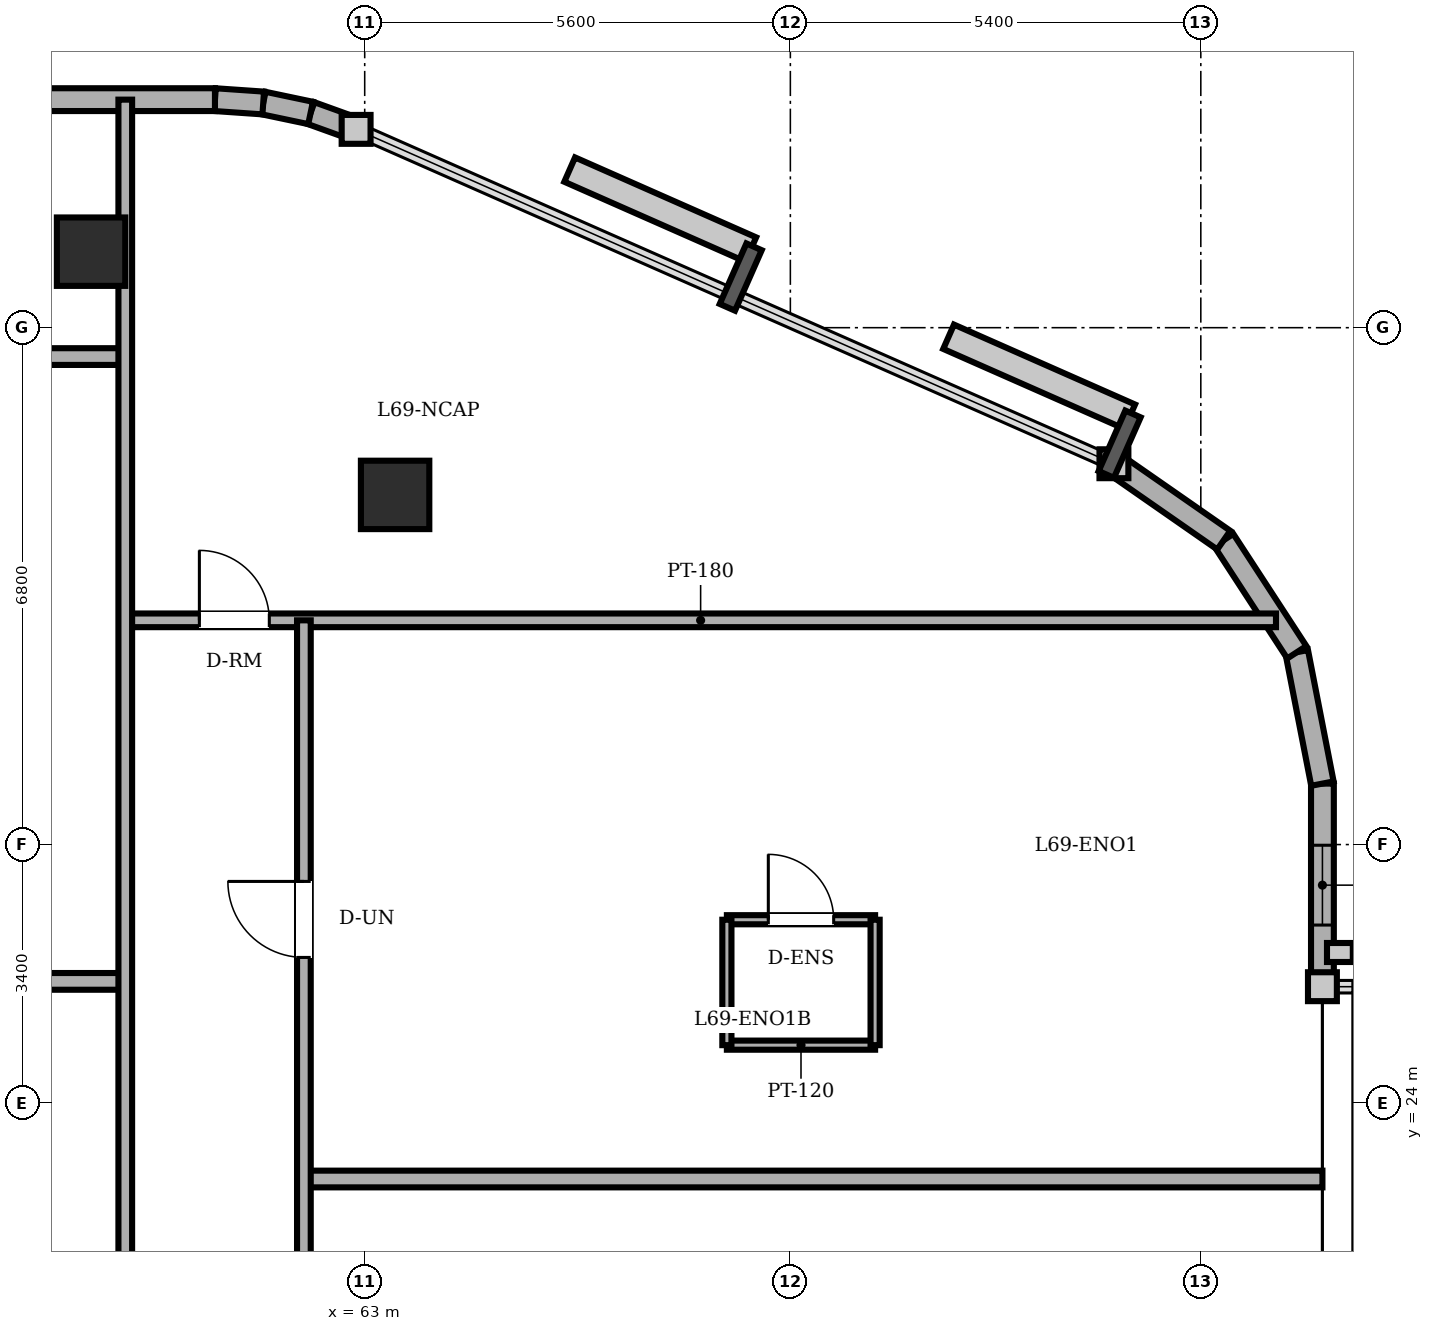
"""IFC4 building model, lengths in metres.
Left out: names, types, materials, properties, quantities, classifications, styles, units other than length and angle.
Written with IfcOpenShell. Run it as: python <this file> out.ifc"""

import sys

from ifc_helpers import new_model, si_unit, direction, frame, frame_2d, origin, origin_2d, place, context, subcontext, project, spatial, rectangle, circle, extrude, element, fill, save


model = new_model("IFC4")
c1 = context("Model", 3, precision=1e-05, world=origin(), true_north=direction((0.0, 1.0)))
c2 = subcontext(c1, "Body", "Model", "MODEL_VIEW")
j1 = project(units=[si_unit("LENGTHUNIT", "METRE"), si_unit("PLANEANGLEUNIT", "RADIAN")], contexts=[c1])
p1 = place(None, origin())
s1 = spatial("IfcSite", under=j1, at=p1, CompositionType="ELEMENT")
p2 = place(p1, origin())
s2 = spatial("IfcBuilding", under=s1, at=p2, CompositionType="ELEMENT")
p3 = place(p2, frame((0.0, 0.0, 266.1)))
s3 = spatial("IfcBuildingStorey", under=s2, at=p3, CompositionType="ELEMENT", Elevation=266.1)
for number, where, z_axis, x_axis in (
    (1, (63.4, 32.0, 0.0), (0.0, 0.0, 1.0), (1.0, 0.0, 0.0)),
    (2, (59.4, 35.2, 0.0), (0.0, 0.0, 1.0), (1.0, 0.0, 0.0)),
):
    element("IfcColumn", number, at=place(p3, frame(where, z_axis=z_axis, x_axis=x_axis)), inside=s3, PredefinedType="COLUMN", context=c2, shape_type="SweptSolid", body=[
        extrude(circle(Radius=0.45, at=origin_2d()), origin(), (0.0, 0.0, 1.0), 3.65),
    ])
p4 = place(p3, frame((75.6, 25.53, 0.0), z_axis=(0.0, 0.0, 1.0), x_axis=(0.0, 1.0, 0.0)))
e3 = element("IfcWall", 3, at=p4, inside=s3, PredefinedType="SOLIDWALL", context=c2, shape_type="SweptSolid", body=[
    extrude(rectangle(XDim=2.672, YDim=0.3, at=frame_2d((1.336, 0.0))), origin(), (0.0, 0.0, 1.0), 3.45),
])
p5 = place(p4, frame((0.811, 0.0, 0.85)))
e4 = element("IfcOpeningElement", 4, at=p5, cuts=e3, PredefinedType="OPENING", context=c2, shape_type="SweptSolid", body=[
    extrude(rectangle(XDim=1.05, YDim=1.55, at=frame_2d((0.525, 0.775))), frame((0.0, 0.16, 0.0), z_axis=(0.0, -1.0, 0.0), x_axis=(1.0, 0.0, 0.0)), (0.0, 0.0, 1.0), 0.32),
])
for number, where, z_axis, x_axis in (
    (5, (75.6, 28.202, 0.0), (0.0, 0.0, 1.0), (-0.192, 0.981, 0.0)),
    (6, (75.263, 29.93, 0.0), (0.0, 0.0, 1.0), (-0.546, 0.838, 0.0)),
):
    element("IfcWall", number, at=place(p3, frame(where, z_axis=z_axis, x_axis=x_axis)), inside=s3, PredefinedType="SOLIDWALL", context=c2, shape_type="SweptSolid", body=[
        extrude(rectangle(XDim=1.76, YDim=0.3, at=frame_2d((0.88, 0.0))), origin(), (0.0, 0.0, 1.0), 3.45),
    ])
p6 = place(p3, frame((74.302, 31.405, 0.0), z_axis=(0.0, 0.0, 1.0), x_axis=(-0.821006966142, 0.570918174124, 0.0)))
e7 = element("IfcWall", 7, at=p6, inside=s3, PredefinedType="SOLIDWALL", context=c2, shape_type="SweptSolid", body=[
    extrude(rectangle(XDim=1.76, YDim=0.3, at=frame_2d((0.88, 0.0))), origin(), (0.0, 0.0, 1.0), 3.45),
])
p7 = place(p3, frame((62.887, 36.809, 0.0), z_axis=(0.0, 0.0, 1.0), x_axis=(-0.94077491148, 0.339031806665, 0.0)))
e8 = element("IfcWall", 8, at=p7, inside=s3, PredefinedType="SOLIDWALL", context=c2, shape_type="SweptSolid", body=[
    extrude(rectangle(XDim=0.636, YDim=0.3, at=frame_2d((0.318, 0.0))), origin(), (0.0, 0.0, 1.0), 3.45),
])
p8 = place(p3, frame((62.288, 37.025, 0.0), z_axis=(0.0, 0.0, 1.0), x_axis=(-0.97857012251, 0.205913854149, 0.0)))
e9 = element("IfcWall", 9, at=p8, inside=s3, PredefinedType="SOLIDWALL", context=c2, shape_type="SweptSolid", body=[
    extrude(rectangle(XDim=0.637, YDim=0.3, at=frame_2d((0.318, 0.0))), origin(), (0.0, 0.0, 1.0), 3.45),
])
p9 = place(p3, frame((61.665, 37.156, 0.0), z_axis=(0.0, 0.0, 1.0), x_axis=(-0.997613959688, 0.069039028352, 0.0)))
e10 = element("IfcWall", 10, at=p9, inside=s3, PredefinedType="SOLIDWALL", context=c2, shape_type="SweptSolid", body=[
    extrude(rectangle(XDim=0.636, YDim=0.3, at=frame_2d((0.318, 0.0))), origin(), (0.0, 0.0, 1.0), 3.45),
])
p10 = place(p3, frame((61.03, 37.2, 0.0), z_axis=(0.0, 0.0, 1.0), x_axis=(-1.0, 0.0, 0.0)))
e11 = element("IfcWall", 11, at=p10, inside=s3, PredefinedType="SOLIDWALL", context=c2, shape_type="SweptSolid", body=[
    extrude(rectangle(XDim=37.03, YDim=0.3, at=frame_2d((18.515, 0.0))), origin(), (0.0, 0.0, 1.0), 3.45),
])
p11 = place(p10, frame((31.03, 0.0, 0.0)))
e12 = element("IfcOpeningElement", 12, at=p11, cuts=e11, PredefinedType="OPENING", context=c2, shape_type="SweptSolid", body=[
    extrude(rectangle(XDim=0.95, YDim=2.2, at=frame_2d((0.475, 1.1))), frame((0.0, 0.16, 0.0), z_axis=(0.0, -1.0, 0.0), x_axis=(1.0, 0.0, 0.0)), (0.0, 0.0, 1.0), 0.32),
])
p12 = place(p10, frame((7.247, 0.0, 0.85)))
e13 = element("IfcOpeningElement", 13, at=p12, cuts=e11, PredefinedType="OPENING", context=c2, shape_type="SweptSolid", body=[
    extrude(rectangle(XDim=1.2, YDim=1.6, at=frame_2d((0.6, 0.8))), frame((0.0, 0.16, 0.0), z_axis=(0.0, -1.0, 0.0), x_axis=(1.0, 0.0, 0.0)), (0.0, 0.0, 1.0), 0.32),
])
p13 = place(p10, frame((13.913, 0.0, 0.85)))
e14 = element("IfcOpeningElement", 14, at=p13, cuts=e11, PredefinedType="OPENING", context=c2, shape_type="SweptSolid", body=[
    extrude(rectangle(XDim=1.2, YDim=1.6, at=frame_2d((0.6, 0.8))), frame((0.0, 0.16, 0.0), z_axis=(0.0, -1.0, 0.0), x_axis=(1.0, 0.0, 0.0)), (0.0, 0.0, 1.0), 0.32),
])
p14 = place(p10, frame((25.747, 0.0, 0.85)))
e15 = element("IfcOpeningElement", 15, at=p14, cuts=e11, PredefinedType="OPENING", context=c2, shape_type="SweptSolid", body=[
    extrude(rectangle(XDim=1.2, YDim=1.6, at=frame_2d((0.6, 0.8))), frame((0.0, 0.16, 0.0), z_axis=(0.0, -1.0, 0.0), x_axis=(1.0, 0.0, 0.0)), (0.0, 0.0, 1.0), 0.32),
])
p15 = place(p3, frame((67.765, 26.411, 0.0), z_axis=(0.0, 0.0, 1.0), x_axis=(1.0, 0.0, 0.0)))
e16 = element("IfcWall", 16, at=p15, inside=s3, PredefinedType="PARTITIONING", context=c2, shape_type="SweptSolid", body=[
    extrude(rectangle(XDim=1.95, YDim=0.12, at=frame_2d((0.975, 0.0))), origin(), (0.0, 0.0, 1.0), 3.45),
])
p16 = place(p15, frame((0.545, 0.0, 0.0)))
e17 = element("IfcOpeningElement", 17, at=p16, cuts=e16, PredefinedType="OPENING", context=c2, shape_type="SweptSolid", body=[
    extrude(rectangle(XDim=0.86, YDim=2.1, at=frame_2d((0.43, 1.05))), frame((0.0, 0.07, 0.0), z_axis=(0.0, -1.0, 0.0), x_axis=(1.0, 0.0, 0.0)), (0.0, 0.0, 1.0), 0.14),
])
p17 = place(p3, frame((69.715, 24.761, 0.0), z_axis=(0.0, 0.0, 1.0), x_axis=(-1.0, 0.0, 0.0)))
e18 = element("IfcWall", 18, at=p17, inside=s3, PredefinedType="PARTITIONING", context=c2, shape_type="SweptSolid", body=[
    extrude(rectangle(XDim=1.95, YDim=0.12, at=frame_2d((0.975, 0.0))), origin(), (0.0, 0.0, 1.0), 3.45),
])
for number, where, z_axis, x_axis in (
    (19, (67.765, 26.411, 0.0), (0.0, 0.0, 1.0), (0.0, -1.0, 0.0)),
    (20, (69.715, 24.761, 0.0), (0.0, 0.0, 1.0), (0.0, 1.0, 0.0)),
):
    element("IfcWall", number, at=place(p3, frame(where, z_axis=z_axis, x_axis=x_axis)), inside=s3, PredefinedType="PARTITIONING", context=c2, shape_type="SweptSolid", body=[
        extrude(rectangle(XDim=1.65, YDim=0.12, at=frame_2d((0.825, 0.0))), origin(), (0.0, 0.0, 1.0), 3.45),
    ])
p18 = place(p3, frame((62.2, 23.0, 0.0), z_axis=(0.0, 0.0, 1.0), x_axis=(1.0, 0.0, 0.0)))
e21 = element("IfcWall", 21, at=p18, inside=s3, PredefinedType="PARTITIONING", context=c2, shape_type="SweptSolid", body=[
    extrude(rectangle(XDim=13.4, YDim=0.22, at=frame_2d((6.7, 0.0))), origin(), (0.0, 0.0, 1.0), 3.45),
])
p19 = place(p3, frame((39.85, 25.6, 0.0), z_axis=(0.0, 0.0, 1.0), x_axis=(1.0, 0.0, 0.0)))
e22 = element("IfcWall", 22, at=p19, inside=s3, PredefinedType="PARTITIONING", context=c2, shape_type="SweptSolid", body=[
    extrude(rectangle(XDim=20.0, YDim=0.22, at=frame_2d((10.0, 0.0))), origin(), (0.0, 0.0, 1.0), 3.45),
])
p20 = place(p3, frame((59.85, 30.35, 0.0), z_axis=(0.0, 0.0, 1.0), x_axis=(1.0, 0.0, 0.0)))
e23 = element("IfcWall", 23, at=p20, inside=s3, PredefinedType="PARTITIONING", context=c2, shape_type="SweptSolid", body=[
    extrude(rectangle(XDim=15.139, YDim=0.18, at=frame_2d((7.569, 0.0))), origin(), (0.0, 0.0, 1.0), 3.45),
])
p21 = place(p20, frame((0.975, 0.0, 0.0)))
e24 = element("IfcOpeningElement", 24, at=p21, cuts=e23, PredefinedType="OPENING", context=c2, shape_type="SweptSolid", body=[
    extrude(rectangle(XDim=0.92, YDim=2.1, at=frame_2d((0.46, 1.05))), frame((0.0, 0.1, 0.0), z_axis=(0.0, -1.0, 0.0), x_axis=(1.0, 0.0, 0.0)), (0.0, 0.0, 1.0), 0.2),
])
p22 = place(p3, frame((39.85, 33.82, 0.0), z_axis=(0.0, 0.0, 1.0), x_axis=(1.0, 0.0, 0.0)))
e25 = element("IfcWall", 25, at=p22, inside=s3, PredefinedType="PARTITIONING", context=c2, shape_type="SweptSolid", body=[
    extrude(rectangle(XDim=20.0, YDim=0.22, at=frame_2d((10.0, 0.0))), origin(), (0.0, 0.0, 1.0), 3.092),
])
p23 = place(p3, frame((59.85, 10.8, 0.0), z_axis=(0.0, 0.0, 1.0), x_axis=(0.0, 1.0, 0.0)))
e26 = element("IfcWall", 26, at=p23, inside=s3, PredefinedType="PARTITIONING", context=c2, shape_type="SweptSolid", body=[
    extrude(rectangle(XDim=26.4, YDim=0.18, at=frame_2d((13.2, 0.0))), origin(), (0.0, 0.0, 1.0), 3.45),
])
p24 = place(p3, frame((62.2, 11.12, 0.0), z_axis=(0.0, 0.0, 1.0), x_axis=(0.0, 1.0, 0.0)))
e27 = element("IfcWall", 27, at=p24, inside=s3, PredefinedType="PARTITIONING", context=c2, shape_type="SweptSolid", body=[
    extrude(rectangle(XDim=19.23, YDim=0.18, at=frame_2d((9.615, 0.0))), origin(), (0.0, 0.0, 1.0), 3.45),
])
p25 = place(p24, frame((14.795, 0.0, 0.0)))
e28 = element("IfcOpeningElement", 28, at=p25, cuts=e27, PredefinedType="OPENING", context=c2, shape_type="SweptSolid", body=[
    extrude(rectangle(XDim=1.0, YDim=2.15, at=frame_2d((0.5, 1.075))), frame((0.0, 0.1, 0.0), z_axis=(0.0, -1.0, 0.0), x_axis=(1.0, 0.0, 0.0)), (0.0, 0.0, 1.0), 0.2),
])
p26 = place(p24, frame((7.856, 0.0, 0.0)))
e29 = element("IfcOpeningElement", 29, at=p26, cuts=e27, PredefinedType="OPENING", context=c2, shape_type="SweptSolid", body=[
    extrude(rectangle(XDim=1.0, YDim=2.15, at=frame_2d((0.5, 1.075))), frame((0.0, 0.1, 0.0), z_axis=(0.0, -1.0, 0.0), x_axis=(1.0, 0.0, 0.0)), (0.0, 0.0, 1.0), 0.2),
])
p27 = place(p5, origin())
e30 = element("IfcWindow", 30, at=p27, inside=s3, PartitioningType="SINGLE_PANEL", PredefinedType="WINDOW", context=c2, shape_type="SweptSolid", body=[
    extrude(rectangle(XDim=1.05, YDim=1.55, at=frame_2d((0.525, 0.775))), frame((0.0, 0.03, 0.0), z_axis=(0.0, -1.0, 0.0), x_axis=(1.0, 0.0, 0.0)), (0.0, 0.0, 1.0), 0.06),
])
fill(e4, e30)
p28 = place(p16, origin())
e31 = element("IfcDoor", 31, at=p28, inside=s3, OperationType="SINGLE_SWING_LEFT", PredefinedType="DOOR", context=c2, shape_type="SweptSolid", body=[
    extrude(rectangle(XDim=0.86, YDim=2.1, at=frame_2d((0.43, 1.05))), frame((0.0, 0.025, 0.0), z_axis=(0.0, -1.0, 0.0), x_axis=(1.0, 0.0, 0.0)), (0.0, 0.0, 1.0), 0.05),
])
fill(e17, e31)
p29 = place(p21, origin())
e32 = element("IfcDoor", 32, at=p29, inside=s3, OperationType="SINGLE_SWING_LEFT", PredefinedType="DOOR", context=c2, shape_type="SweptSolid", body=[
    extrude(rectangle(XDim=0.92, YDim=2.1, at=frame_2d((0.46, 1.05))), frame((0.0, 0.025, 0.0), z_axis=(0.0, -1.0, 0.0), x_axis=(1.0, 0.0, 0.0)), (0.0, 0.0, 1.0), 0.05),
])
fill(e24, e32)
p30 = place(p25, origin())
e33 = element("IfcDoor", 33, at=p30, inside=s3, OperationType="SINGLE_SWING_RIGHT", PredefinedType="DOOR", context=c2, shape_type="SweptSolid", body=[
    extrude(rectangle(XDim=1.0, YDim=2.15, at=frame_2d((0.5, 1.075))), frame((0.0, 0.025, 0.0), z_axis=(0.0, -1.0, 0.0), x_axis=(1.0, 0.0, 0.0)), (0.0, 0.0, 1.0), 0.05),
])
fill(e28, e33)
save(model, sys.argv[1])
